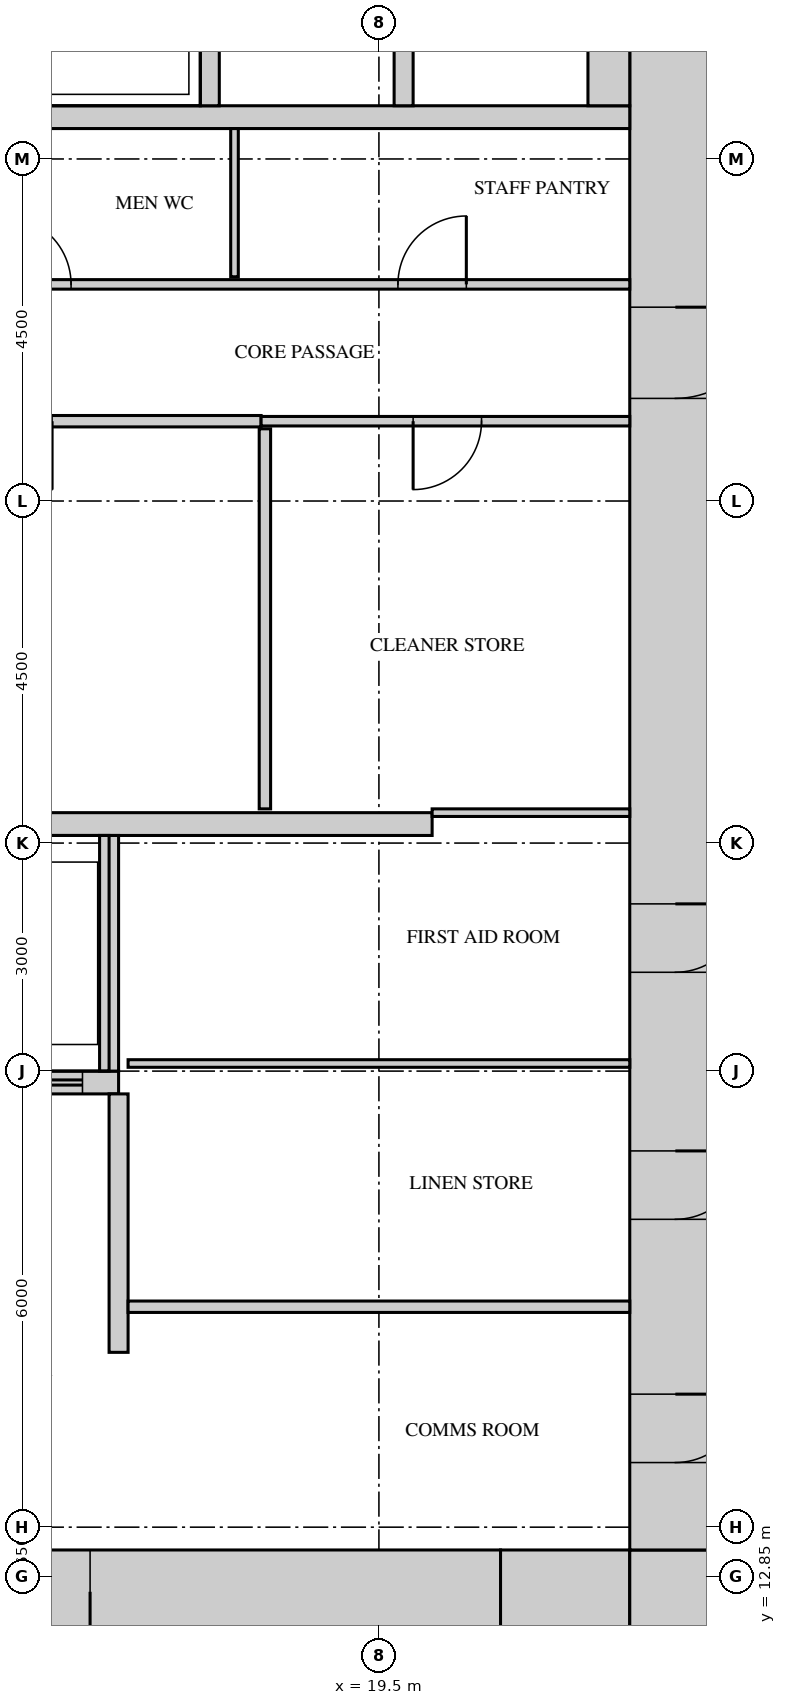
"""IFC4 building model, lengths in metres.
Left out: names, types, materials, properties, quantities, classifications, styles, units other than length and angle.
Written with IfcOpenShell. Run it as: python <this file> out.ifc"""

import sys

from ifc_helpers import new_model, si_unit, direction, frame, frame_2d, origin, place, context, subcontext, project, spatial, rectangle, extrude, source, transform, mapped, element, fill, save


model = new_model("IFC4")
c1 = context("Model", 3, precision=1e-05, world=origin(), true_north=direction((0.0, 1.0)))
c2 = subcontext(c1, "Body", "Model", "MODEL_VIEW")
j1 = project(units=[si_unit("LENGTHUNIT", "METRE"), si_unit("PLANEANGLEUNIT", "RADIAN")], contexts=[c1])
p1 = place(None, origin())
s1 = spatial("IfcSite", under=j1, at=p1, CompositionType="ELEMENT")
p2 = place(p1, origin())
s2 = spatial("IfcBuilding", under=s1, at=p2, CompositionType="ELEMENT")
p3 = place(p2, frame((0.0, 0.0, 51.0)))
s3 = spatial("IfcBuildingStorey", under=s2, at=p3, CompositionType="ELEMENT", Elevation=51.0)
m1 = source(origin(), c2, "Body", "SweptSolid", [
    extrude(rectangle(XDim=7.2, YDim=1.1, at=frame_2d((3.6, 0.0))), origin(), (0.0, 0.0, 1.0), 4.2),
])
p4 = place(p3, frame((13.9, 12.65, 0.0), z_axis=(0.0, 0.0, 1.0), x_axis=(1.0, 0.0, 0.0)))
e1 = element("IfcWall", 1, at=p4, inside=s3, PredefinedType="SHEAR", context=c2, shape_type="MappedRepresentation", body=[
    mapped(m1, transform((0.0, 0.0, 0.0))),
])
m2 = source(origin(), c2, "Body", "SweptSolid", [
    extrude(rectangle(XDim=1.0, YDim=2.1, at=frame_2d((0.5, 1.05))), frame((0.0, 0.56, 0.0), z_axis=(0.0, -1.0, 0.0), x_axis=(1.0, 0.0, 0.0)), (0.0, 0.0, 1.0), 1.12),
])
p5 = place(p4, frame((0.8, 0.0, 0.0)))
e2 = element("IfcOpeningElement", 2, at=p5, cuts=e1, PredefinedType="OPENING", context=c2, shape_type="MappedRepresentation", body=[
    mapped(m2, transform((0.0, 0.0, 0.0))),
])
m3 = source(origin(), c2, "Body", "SweptSolid", [
    extrude(rectangle(XDim=1.7, YDim=1.2, at=frame_2d((0.85, 0.0))), origin(), (0.0, 0.0, 1.0), 4.2),
])
p6 = place(p3, frame((21.1, 12.6, 0.0), z_axis=(0.0, 0.0, 1.0), x_axis=(1.0, 0.0, 0.0)))
e3 = element("IfcWall", 3, at=p6, inside=s3, PredefinedType="SHEAR", context=c2, shape_type="MappedRepresentation", body=[
    mapped(m3, transform((0.0, 0.0, 0.0))),
])
m4 = source(origin(), c2, "Body", "SweptSolid", [
    extrude(rectangle(XDim=1.2, YDim=1.2, at=frame_2d((0.6, 0.0))), origin(), (0.0, 0.0, 1.0), 4.2),
])
p7 = place(p3, frame((22.8, 12.6, 0.0), z_axis=(0.0, 0.0, 1.0), x_axis=(1.0, 0.0, 0.0)))
e4 = element("IfcWall", 4, at=p7, inside=s3, PredefinedType="SHEAR", context=c2, shape_type="MappedRepresentation", body=[
    mapped(m4, transform((0.0, 0.0, 0.0))),
])
m5 = source(origin(), c2, "Body", "SweptSolid", [
    extrude(rectangle(XDim=27.6, YDim=1.2, at=frame_2d((13.8, 0.0))), origin(), (0.0, 0.0, 1.0), 4.2),
])
p8 = place(p3, frame((23.4, 13.2, 0.0), z_axis=(0.0, 0.0, 1.0), x_axis=(0.0, 1.0, 0.0)))
e5 = element("IfcWall", 5, at=p8, inside=s3, PredefinedType="SHEAR", context=c2, shape_type="MappedRepresentation", body=[
    mapped(m5, transform((0.0, 0.0, 0.0))),
])
m6 = source(origin(), c2, "Body", "SweptSolid", [
    extrude(rectangle(XDim=1.8, YDim=2.1, at=frame_2d((0.9, 1.05))), frame((0.0, 0.61, 0.0), z_axis=(0.0, -1.0, 0.0), x_axis=(1.0, 0.0, 0.0)), (0.0, 0.0, 1.0), 1.22),
])
p9 = place(p8, frame((22.4, 0.0, 0.0)))
e6 = element("IfcOpeningElement", 6, at=p9, cuts=e5, PredefinedType="OPENING", context=c2, shape_type="MappedRepresentation", body=[
    mapped(m6, transform((0.0, 0.0, 0.0))),
])
m7 = source(origin(), c2, "Body", "SweptSolid", [
    extrude(rectangle(XDim=1.2, YDim=2.1, at=frame_2d((0.6, 1.05))), frame((0.0, 0.61, 0.0), z_axis=(0.0, -1.0, 0.0), x_axis=(1.0, 0.0, 0.0)), (0.0, 0.0, 1.0), 1.22),
])
p10 = place(p8, frame((15.15, 0.0, 0.0)))
e7 = element("IfcOpeningElement", 7, at=p10, cuts=e5, PredefinedType="OPENING", context=c2, shape_type="MappedRepresentation", body=[
    mapped(m7, transform((0.0, 0.0, 0.0))),
])
m8 = source(origin(), c2, "Body", "SweptSolid", [
    extrude(rectangle(XDim=0.9, YDim=2.1, at=frame_2d((0.45, 1.05))), frame((0.0, 0.61, 0.0), z_axis=(0.0, -1.0, 0.0), x_axis=(1.0, 0.0, 0.0)), (0.0, 0.0, 1.0), 1.22),
])
p11 = place(p8, frame((1.15, 0.0, 0.0)))
e8 = element("IfcOpeningElement", 8, at=p11, cuts=e5, PredefinedType="OPENING", context=c2, shape_type="MappedRepresentation", body=[
    mapped(m8, transform((0.0, 0.0, 0.0))),
])
p12 = place(p8, frame((4.35, 0.0, 0.0)))
e9 = element("IfcOpeningElement", 9, at=p12, cuts=e5, PredefinedType="OPENING", context=c2, shape_type="MappedRepresentation", body=[
    mapped(m8, transform((0.0, 0.0, 0.0))),
])
p13 = place(p8, frame((7.6, 0.0, 0.0)))
e10 = element("IfcOpeningElement", 10, at=p13, cuts=e5, PredefinedType="OPENING", context=c2, shape_type="MappedRepresentation", body=[
    mapped(m8, transform((0.0, 0.0, 0.0))),
])
m9 = source(origin(), c2, "Body", "SweptSolid", [
    extrude(rectangle(XDim=13.0, YDim=0.3, at=frame_2d((6.5, 0.0))), origin(), (0.0, 0.0, 1.0), 4.2),
])
p14 = place(p3, frame((7.2, 22.75, 0.0), z_axis=(0.0, 0.0, 1.0), x_axis=(1.0, 0.0, 0.0)))
e11 = element("IfcWall", 11, at=p14, inside=s3, PredefinedType="STANDARD", context=c2, shape_type="MappedRepresentation", body=[
    mapped(m9, transform((0.0, 0.0, 0.0))),
])
m10 = source(origin(), c2, "Body", "SweptSolid", [
    extrude(rectangle(XDim=8.875, YDim=0.3, at=frame_2d((4.438, 0.0))), origin(), (0.0, 0.0, 1.0), 4.2),
])
p15 = place(p3, frame((7.2, 19.35, 0.0), z_axis=(0.0, 0.0, 1.0), x_axis=(1.0, 0.0, 0.0)))
e12 = element("IfcWall", 12, at=p15, inside=s3, PredefinedType="STANDARD", context=c2, shape_type="MappedRepresentation", body=[
    mapped(m10, transform((0.0, 0.0, 0.0))),
])
m11 = source(origin(), c2, "Body", "SweptSolid", [
    extrude(rectangle(XDim=1.2, YDim=2.1, at=frame_2d((0.6, 1.05))), frame((0.0, 0.16, 0.0), z_axis=(0.0, -1.0, 0.0), x_axis=(1.0, 0.0, 0.0)), (0.0, 0.0, 1.0), 0.32),
])
p16 = place(p15, frame((0.45, 0.0, 0.0)))
e13 = element("IfcOpeningElement", 13, at=p16, cuts=e12, PredefinedType="OPENING", context=c2, shape_type="MappedRepresentation", body=[
    mapped(m11, transform((0.0, 0.0, 0.0))),
])
p17 = place(p15, frame((2.8, 0.0, 0.0)))
e14 = element("IfcOpeningElement", 14, at=p17, cuts=e12, PredefinedType="OPENING", context=c2, shape_type="MappedRepresentation", body=[
    mapped(m11, transform((0.0, 0.0, 0.0))),
])
p18 = place(p15, frame((5.05, 0.0, 0.0)))
e15 = element("IfcOpeningElement", 15, at=p18, cuts=e12, PredefinedType="OPENING", context=c2, shape_type="MappedRepresentation", body=[
    mapped(m11, transform((0.0, 0.0, 0.0))),
])
p19 = place(p15, frame((7.2, 0.0, 0.0)))
e16 = element("IfcOpeningElement", 16, at=p19, cuts=e12, PredefinedType="OPENING", context=c2, shape_type="MappedRepresentation", body=[
    mapped(m11, transform((0.0, 0.0, 0.0))),
])
m12 = source(origin(), c2, "Body", "SweptSolid", [
    extrude(rectangle(XDim=15.6, YDim=0.3, at=frame_2d((7.8, 0.0))), origin(), (0.0, 0.0, 1.0), 4.2),
])
p20 = place(p3, frame((7.2, 32.05, 0.0), z_axis=(0.0, 0.0, 1.0), x_axis=(1.0, 0.0, 0.0)))
e17 = element("IfcWall", 17, at=p20, inside=s3, PredefinedType="STANDARD", context=c2, shape_type="MappedRepresentation", body=[
    mapped(m12, transform((0.0, 0.0, 0.0))),
])
m13 = source(origin(), c2, "Body", "SweptSolid", [
    extrude(rectangle(XDim=3.1, YDim=0.25, at=frame_2d((1.55, 0.0))), origin(), (0.0, 0.0, 1.0), 4.2),
])
p21 = place(p3, frame((15.95, 19.5, 0.0), z_axis=(0.0, 0.0, 1.0), x_axis=(0.0, 1.0, 0.0)))
e18 = element("IfcWall", 18, at=p21, inside=s3, PredefinedType="STANDARD", context=c2, shape_type="MappedRepresentation", body=[
    mapped(m13, transform((0.0, 0.0, 0.0))),
])
m14 = source(origin(), c2, "Body", "SweptSolid", [
    extrude(rectangle(XDim=2.4, YDim=0.25, at=frame_2d((1.2, 0.0))), origin(), (0.0, 0.0, 1.0), 4.2),
])
for number, where, z_axis, x_axis in (
    (19, (17.275, 32.2, 0.0), (0.0, 0.0, 1.0), (0.0, 1.0, 0.0)),
    (20, (19.825, 32.2, 0.0), (0.0, 0.0, 1.0), (0.0, 1.0, 0.0)),
):
    element("IfcWall", number, at=place(p3, frame(where, z_axis=z_axis, x_axis=x_axis)), inside=s3, PredefinedType="STANDARD", context=c2, shape_type="MappedRepresentation", body=[
        mapped(m14, transform((0.0, 0.0, 0.0))),
    ])
m15 = source(origin(), c2, "Body", "SweptSolid", [
    extrude(rectangle(XDim=2.4, YDim=0.55, at=frame_2d((1.2, 0.0))), origin(), (0.0, 0.0, 1.0), 4.2),
])
p22 = place(p3, frame((22.525, 32.2, 0.0), z_axis=(0.0, 0.0, 1.0), x_axis=(0.0, 1.0, 0.0)))
e21 = element("IfcWall", 21, at=p22, inside=s3, PredefinedType="STANDARD", context=c2, shape_type="MappedRepresentation", body=[
    mapped(m15, transform((0.0, 0.0, 0.0))),
])
m16 = source(origin(), c2, "Body", "SweptSolid", [
    extrude(rectangle(XDim=3.4, YDim=0.25, at=frame_2d((1.7, 0.0))), origin(), (0.0, 0.0, 1.0), 4.2),
])
p23 = place(p3, frame((16.075, 15.8, 0.0), z_axis=(0.0, 0.0, 1.0), x_axis=(0.0, 1.0, 0.0)))
e22 = element("IfcWall", 22, at=p23, inside=s3, PredefinedType="STANDARD", context=c2, shape_type="MappedRepresentation", body=[
    mapped(m16, transform((0.0, 0.0, 0.0))),
])
m17 = source(origin(), c2, "Body", "SweptSolid", [
    extrude(rectangle(XDim=6.6, YDim=0.15, at=frame_2d((3.3, 0.0))), origin(), (0.0, 0.0, 1.0), 4.3),
])
p24 = place(p3, frame((16.2, 16.4, 0.0), z_axis=(0.0, 0.0, 1.0), x_axis=(1.0, 0.0, 0.0)))
e23 = element("IfcWall", 23, at=p24, inside=s3, PredefinedType="PARTITIONING", context=c2, shape_type="MappedRepresentation", body=[
    mapped(m17, transform((0.0, 0.0, 0.0))),
])
m18 = source(origin(), c2, "Body", "SweptSolid", [
    extrude(rectangle(XDim=6.6, YDim=0.1, at=frame_2d((3.3, 0.0))), origin(), (0.0, 0.0, 1.0), 4.3),
])
p25 = place(p3, frame((16.2, 19.6, 0.0), z_axis=(0.0, 0.0, 1.0), x_axis=(1.0, 0.0, 0.0)))
e24 = element("IfcWall", 24, at=p25, inside=s3, PredefinedType="PARTITIONING", context=c2, shape_type="MappedRepresentation", body=[
    mapped(m18, transform((0.0, 0.0, 0.0))),
])
m19 = source(origin(), c2, "Body", "SweptSolid", [
    extrude(rectangle(XDim=2.6, YDim=0.1, at=frame_2d((1.3, 0.0))), origin(), (0.0, 0.0, 1.0), 4.3),
])
p26 = place(p3, frame((20.2, 22.9, 0.0), z_axis=(0.0, 0.0, 1.0), x_axis=(1.0, 0.0, 0.0)))
e25 = element("IfcWall", 25, at=p26, inside=s3, PredefinedType="PARTITIONING", context=c2, shape_type="MappedRepresentation", body=[
    mapped(m19, transform((0.0, 0.0, 0.0))),
])
m20 = source(origin(), c2, "Body", "SweptSolid", [
    extrude(rectangle(XDim=5.0, YDim=0.15, at=frame_2d((2.5, 0.0))), origin(), (0.0, 0.0, 1.0), 4.3),
])
p27 = place(p3, frame((18.0, 22.95, 0.0), z_axis=(0.0, 0.0, 1.0), x_axis=(0.0, 1.0, 0.0)))
e26 = element("IfcWall", 26, at=p27, inside=s3, PredefinedType="PARTITIONING", context=c2, shape_type="MappedRepresentation", body=[
    mapped(m20, transform((0.0, 0.0, 0.0))),
])
m21 = source(origin(), c2, "Body", "SweptSolid", [
    extrude(rectangle(XDim=6.4, YDim=0.15, at=frame_2d((3.2, 0.0))), origin(), (0.0, 0.0, 1.0), 4.3),
])
p28 = place(p3, frame((11.55, 28.05, 0.0), z_axis=(0.0, 0.0, 1.0), x_axis=(1.0, 0.0, 0.0)))
e27 = element("IfcWall", 27, at=p28, inside=s3, PredefinedType="PARTITIONING", context=c2, shape_type="MappedRepresentation", body=[
    mapped(m21, transform((0.0, 0.0, 0.0))),
])
m22 = source(origin(), c2, "Body", "SweptSolid", [
    extrude(rectangle(XDim=0.9, YDim=2.1, at=frame_2d((0.45, 1.05))), frame((0.0, 0.085, 0.0), z_axis=(0.0, -1.0, 0.0), x_axis=(1.0, 0.0, 0.0)), (0.0, 0.0, 1.0), 0.17),
])
p29 = place(p28, frame((2.75, 0.0, 0.0)))
e28 = element("IfcOpeningElement", 28, at=p29, cuts=e27, PredefinedType="OPENING", context=c2, shape_type="MappedRepresentation", body=[
    mapped(m22, transform((0.0, 0.0, 0.0))),
])
m23 = source(origin(), c2, "Body", "SweptSolid", [
    extrude(rectangle(XDim=4.85, YDim=0.125, at=frame_2d((2.425, 0.0))), origin(), (0.0, 0.0, 1.0), 4.3),
])
p30 = place(p3, frame((17.95, 28.05, 0.0), z_axis=(0.0, 0.0, 1.0), x_axis=(1.0, 0.0, 0.0)))
e29 = element("IfcWall", 29, at=p30, inside=s3, PredefinedType="PARTITIONING", context=c2, shape_type="MappedRepresentation", body=[
    mapped(m23, transform((0.0, 0.0, 0.0))),
])
m24 = source(origin(), c2, "Body", "SweptSolid", [
    extrude(rectangle(XDim=0.9, YDim=2.1, at=frame_2d((0.45, 1.05))), frame((0.0, 0.073, 0.0), z_axis=(0.0, -1.0, 0.0), x_axis=(1.0, 0.0, 0.0)), (0.0, 0.0, 1.0), 0.145),
])
p31 = place(p30, frame((2.0, 0.0, 0.0)))
e30 = element("IfcOpeningElement", 30, at=p31, cuts=e29, PredefinedType="OPENING", context=c2, shape_type="MappedRepresentation", body=[
    mapped(m24, transform((0.0, 0.0, 0.0))),
])
m25 = source(origin(), c2, "Body", "SweptSolid", [
    extrude(rectangle(XDim=15.6, YDim=0.125, at=frame_2d((7.8, 0.0))), origin(), (0.0, 0.0, 1.0), 4.3),
])
p32 = place(p3, frame((7.2, 29.85, 0.0), z_axis=(0.0, 0.0, 1.0), x_axis=(1.0, 0.0, 0.0)))
e31 = element("IfcWall", 31, at=p32, inside=s3, PredefinedType="PARTITIONING", context=c2, shape_type="MappedRepresentation", body=[
    mapped(m25, transform((0.0, 0.0, 0.0))),
])
p33 = place(p32, frame((2.15, 0.0, 0.0)))
e32 = element("IfcOpeningElement", 32, at=p33, cuts=e31, PredefinedType="OPENING", context=c2, shape_type="MappedRepresentation", body=[
    mapped(m24, transform((0.0, 0.0, 0.0))),
])
p34 = place(p32, frame((7.35, 0.0, 0.0)))
e33 = element("IfcOpeningElement", 33, at=p34, cuts=e31, PredefinedType="OPENING", context=c2, shape_type="MappedRepresentation", body=[
    mapped(m24, transform((0.0, 0.0, 0.0))),
])
p35 = place(p32, frame((12.55, 0.0, 0.0)))
e34 = element("IfcOpeningElement", 34, at=p35, cuts=e31, PredefinedType="OPENING", context=c2, shape_type="MappedRepresentation", body=[
    mapped(m24, transform((0.0, 0.0, 0.0))),
])
m26 = source(origin(), c2, "Body", "SweptSolid", [
    extrude(rectangle(XDim=1.95, YDim=0.1, at=frame_2d((0.975, 0.0))), origin(), (0.0, 0.0, 1.0), 4.3),
])
p36 = place(p3, frame((17.6, 29.95, 0.0), z_axis=(0.0, 0.0, 1.0), x_axis=(0.0, 1.0, 0.0)))
e35 = element("IfcWall", 35, at=p36, inside=s3, PredefinedType="PARTITIONING", context=c2, shape_type="MappedRepresentation", body=[
    mapped(m26, transform((0.0, 0.0, 0.0))),
])
m27 = source(origin(), c2, "Body", "SweptSolid", [
    extrude(rectangle(XDim=1.2, YDim=2.1, at=frame_2d((0.6, 1.05))), frame((0.0, 0.55, 0.0), z_axis=(0.0, -1.0, 0.0), x_axis=(1.0, 0.0, 0.0)), (0.0, 0.0, 1.0), 1.1),
])
p37 = place(p10, origin())
e36 = element("IfcDoor", 36, at=p37, inside=s3, OperationType="SINGLE_SWING_RIGHT", PredefinedType="DOOR", context=c2, shape_type="MappedRepresentation", body=[
    mapped(m27, transform((0.0, 0.0, 0.0))),
])
fill(e7, e36)
m28 = source(origin(), c2, "Body", "SweptSolid", [
    extrude(rectangle(XDim=0.9, YDim=2.1, at=frame_2d((0.45, 1.05))), frame((0.0, 0.025, 0.0), z_axis=(0.0, -1.0, 0.0), x_axis=(1.0, 0.0, 0.0)), (0.0, 0.0, 1.0), 0.05),
])
p38 = place(p34, origin())
e37 = element("IfcDoor", 37, at=p38, inside=s3, OperationType="SINGLE_SWING_RIGHT", PredefinedType="DOOR", context=c2, shape_type="MappedRepresentation", body=[
    mapped(m28, transform((0.0, 0.0, 0.0))),
])
fill(e33, e37)
p39 = place(p35, origin())
e38 = element("IfcDoor", 38, at=p39, inside=s3, OperationType="SINGLE_SWING_LEFT", PredefinedType="DOOR", context=c2, shape_type="MappedRepresentation", body=[
    mapped(m28, transform((0.0, 0.0, 0.0))),
])
fill(e34, e38)
p40 = place(p31, origin())
e39 = element("IfcDoor", 39, at=p40, inside=s3, OperationType="SINGLE_SWING_LEFT", PredefinedType="DOOR", context=c2, shape_type="MappedRepresentation", body=[
    mapped(m28, transform((0.0, 0.0, 0.0))),
])
fill(e30, e39)
m29 = source(origin(), c2, "Body", "SweptSolid", [
    extrude(rectangle(XDim=0.9, YDim=2.1, at=frame_2d((0.45, 1.05))), frame((0.0, 0.55, 0.0), z_axis=(0.0, -1.0, 0.0), x_axis=(1.0, 0.0, 0.0)), (0.0, 0.0, 1.0), 1.1),
])
p41 = place(p11, origin())
e40 = element("IfcDoor", 40, at=p41, inside=s3, OperationType="SINGLE_SWING_RIGHT", PredefinedType="DOOR", context=c2, shape_type="MappedRepresentation", body=[
    mapped(m29, transform((0.0, 0.0, 0.0))),
])
fill(e8, e40)
p42 = place(p12, origin())
e41 = element("IfcDoor", 41, at=p42, inside=s3, OperationType="SINGLE_SWING_RIGHT", PredefinedType="DOOR", context=c2, shape_type="MappedRepresentation", body=[
    mapped(m29, transform((0.0, 0.0, 0.0))),
])
fill(e9, e41)
p43 = place(p13, origin())
e42 = element("IfcDoor", 42, at=p43, inside=s3, OperationType="SINGLE_SWING_RIGHT", PredefinedType="DOOR", context=c2, shape_type="MappedRepresentation", body=[
    mapped(m29, transform((0.0, 0.0, 0.0))),
])
fill(e10, e42)
m30 = source(origin(), c2, "Body", "SweptSolid", [
    extrude(rectangle(XDim=1.0, YDim=2.1, at=frame_2d((0.5, 1.05))), frame((0.0, 0.5, 0.0), z_axis=(0.0, -1.0, 0.0), x_axis=(1.0, 0.0, 0.0)), (0.0, 0.0, 1.0), 1.0),
])
p44 = place(p5, origin())
e43 = element("IfcDoor", 43, at=p44, inside=s3, OperationType="SINGLE_SWING_RIGHT", PredefinedType="DOOR", context=c2, shape_type="MappedRepresentation", body=[
    mapped(m30, transform((0.0, 0.0, 0.0))),
])
fill(e2, e43)
m31 = source(origin(), c2, "Body", "SweptSolid", [
    extrude(rectangle(XDim=1.2, YDim=2.1, at=frame_2d((0.6, 1.05))), frame((0.0, 0.025, 0.0), z_axis=(0.0, -1.0, 0.0), x_axis=(1.0, 0.0, 0.0)), (0.0, 0.0, 1.0), 0.05),
])
p45 = place(p19, origin())
e44 = element("IfcDoor", 44, at=p45, inside=s3, OperationType="DOUBLE_DOOR_SLIDING", PredefinedType="DOOR", context=c2, shape_type="MappedRepresentation", body=[
    mapped(m31, transform((0.0, 0.0, 0.0))),
])
fill(e16, e44)
save(model, sys.argv[1])
